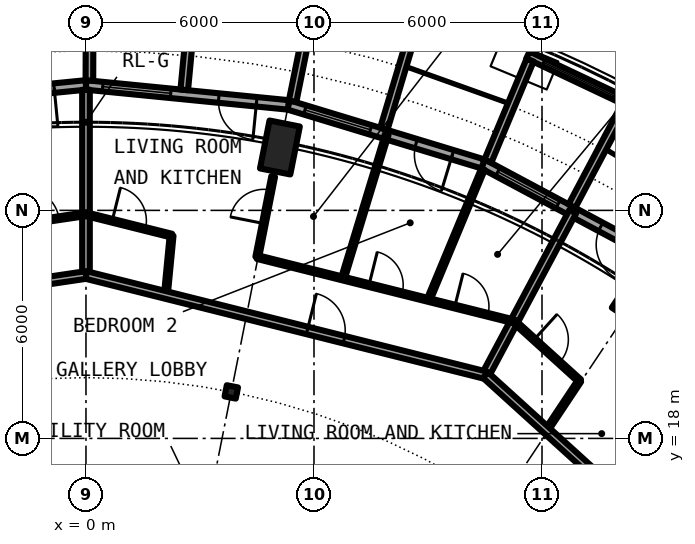
"""IFC4 building model, lengths in metres.
Left out: names, types, materials, properties, quantities, classifications, styles, units other than length and angle.
Written with IfcOpenShell. Run it as: python <this file> out.ifc"""

import sys

from ifc_helpers import new_model, si_unit, direction, frame, frame_2d, origin, origin_2d, place, context, subcontext, project, spatial, rectangle, circle, hollow_circle, i_section, extrude, element, fill, save


model = new_model("IFC4")
c1 = context("Model", 3, precision=1e-05, world=origin(), true_north=direction((0.0, 1.0)))
c2 = subcontext(c1, "Body", "Model", "MODEL_VIEW")
j1 = project(units=[si_unit("LENGTHUNIT", "METRE"), si_unit("PLANEANGLEUNIT", "RADIAN")], contexts=[c1])
p1 = place(None, origin())
s1 = spatial("IfcSite", under=j1, at=p1, CompositionType="ELEMENT")
p2 = place(p1, origin())
s2 = spatial("IfcBuilding", under=s1, at=p2, CompositionType="ELEMENT")
p3 = place(p2, frame((0.0, 0.0, 234.05)))
s3 = spatial("IfcBuildingStorey", under=s2, at=p3, CompositionType="ELEMENT", Elevation=234.05)
p4 = place(p3, frame((14.889, 22.283, 0.0), z_axis=(-0.231777820067, -0.346913947437, 0.908806775502), x_axis=(0.831494710184, -0.555532669549, 0.0)))
e1 = element("IfcColumn", 1, at=p4, inside=s3, PredefinedType="COLUMN", context=c2, shape_type="SweptSolid", body=[
    extrude(hollow_circle(Radius=0.406, WallThickness=0.03, at=origin_2d()), origin(), (0.0, 0.0, 1.0), 3.081),
])
p5 = place(p3, frame((5.229, 26.285, 0.0), z_axis=(-0.081382632414, -0.409131968018, 0.908838764516), x_axis=(0.980784718923, -0.195093144748, 0.0)))
e2 = element("IfcColumn", 2, at=p5, inside=s3, PredefinedType="COLUMN", context=c2, shape_type="SweptSolid", body=[
    extrude(hollow_circle(Radius=0.406, WallThickness=0.03, at=origin_2d()), origin(), (0.0, 0.0, 1.0), 3.081),
])
p6 = place(p3, frame((3.824, 19.223, 0.0), z_axis=(0.0, 0.0, 1.0), x_axis=(0.195090322016, 0.980785280403, 0.0)))
e3 = element("IfcColumn", 3, at=p6, inside=s3, PredefinedType="COLUMN", context=c2, shape_type="SweptSolid", body=[
    extrude(i_section(OverallWidth=0.3, OverallDepth=0.3, WebThickness=0.011, FlangeThickness=0.019, FilletRadius=0.027, at=origin_2d()), origin(), (0.0, 0.0, 1.0), 3.05),
])
p7 = place(p3, frame((15.167, 22.699, 0.0), z_axis=(0.0, 0.0, 1.0), x_axis=(-0.881915646801, 0.471407246368, 0.0)))
e4 = element("IfcWall", 4, at=p7, inside=s3, PredefinedType="SOLIDWALL", context=c2, shape_type="SweptSolid", body=[
    extrude(rectangle(XDim=5.352, YDim=0.25, at=frame_2d((2.676, 0.0))), origin(), (0.0, 0.0, 1.0), 2.7),
])
p8 = place(p7, frame((0.841, 0.0, 0.0)))
e5 = element("IfcOpeningElement", 5, at=p8, cuts=e4, PredefinedType="OPENING", context=c2, shape_type="SweptSolid", body=[
    extrude(rectangle(XDim=1.0, YDim=2.2, at=frame_2d((0.5, 1.1))), frame((0.0, 0.135, 0.0), z_axis=(0.0, -1.0, 0.0), x_axis=(1.0, 0.0, 0.0)), (0.0, 0.0, 1.0), 0.27),
])
p9 = place(p7, frame((3.111, 0.0, 0.3)))
e6 = element("IfcOpeningElement", 6, at=p9, cuts=e4, PredefinedType="OPENING", context=c2, shape_type="SweptSolid", body=[
    extrude(rectangle(XDim=1.8, YDim=2.1, at=frame_2d((0.9, 1.05))), frame((0.0, 0.135, 0.0), z_axis=(0.0, -1.0, 0.0), x_axis=(1.0, 0.0, 0.0)), (0.0, 0.0, 1.0), 0.27),
])
p10 = place(p3, frame((14.335, 26.808, -0.03), z_axis=(0.0, 0.0, 1.0), x_axis=(-0.904000060331, 0.427532327342, 0.0)))
e7 = element("IfcWall", 7, at=p10, inside=s3, PredefinedType="SOLIDWALL", context=c2, shape_type="SweptSolid", body=[
    extrude(rectangle(XDim=2.993, YDim=0.2, at=frame_2d((1.497, 0.0))), origin(), (0.0, 0.0, 1.0), 2.73),
])
p11 = place(p10, frame((0.457, 0.0, 0.33)))
e8 = element("IfcOpeningElement", 8, at=p11, cuts=e7, PredefinedType="OPENING", context=c2, shape_type="SweptSolid", body=[
    extrude(circle(Radius=1.04, at=frame_2d((1.04, 1.04))), frame((0.0, 0.11, 0.0), z_axis=(0.0, -1.0, 0.0), x_axis=(1.0, 0.0, 0.0)), (0.0, 0.0, 1.0), 0.22),
])
p12 = place(p3, frame((12.787, 24.113, -0.03), z_axis=(0.0, 0.0, 1.0), x_axis=(0.468365282436, 0.883534924159, 0.0)))
e9 = element("IfcWall", 9, at=p12, inside=s3, PredefinedType="SOLIDWALL", context=c2, shape_type="SweptSolid", body=[
    extrude(rectangle(XDim=3.006, YDim=0.2, at=frame_2d((1.503, 0.0))), origin(), (0.0, 0.0, 1.0), 2.73),
])
p13 = place(p3, frame((10.575, 25.295, -0.03), z_axis=(0.0, 0.0, 1.0), x_axis=(0.385697364644, 0.922625353492, 0.0)))
e10 = element("IfcWall", 10, at=p13, inside=s3, PredefinedType="SOLIDWALL", context=c2, shape_type="SweptSolid", body=[
    extrude(rectangle(XDim=2.883, YDim=0.2, at=frame_2d((1.442, 0.0))), origin(), (0.0, 0.0, 1.0), 2.73),
])
p14 = place(p3, frame((10.447, 25.222, 0.0), z_axis=(0.0, 0.0, 1.0), x_axis=(-0.956965678721, 0.290201119486, 0.0)))
e11 = element("IfcWall", 11, at=p14, inside=s3, PredefinedType="SOLIDWALL", context=c2, shape_type="SweptSolid", body=[
    extrude(rectangle(XDim=5.351, YDim=0.25, at=frame_2d((2.676, 0.0))), origin(), (0.0, 0.0, 1.0), 2.7),
])
p15 = place(p14, frame((0.841, 0.0, 0.0)))
e12 = element("IfcOpeningElement", 12, at=p15, cuts=e11, PredefinedType="OPENING", context=c2, shape_type="SweptSolid", body=[
    extrude(rectangle(XDim=1.0, YDim=2.2, at=frame_2d((0.5, 1.1))), frame((0.0, 0.135, 0.0), z_axis=(0.0, -1.0, 0.0), x_axis=(1.0, 0.0, 0.0)), (0.0, 0.0, 1.0), 0.27),
])
p16 = place(p14, frame((3.096, 0.0, 0.3)))
e13 = element("IfcOpeningElement", 13, at=p16, cuts=e11, PredefinedType="OPENING", context=c2, shape_type="SweptSolid", body=[
    extrude(rectangle(XDim=1.8, YDim=2.1, at=frame_2d((0.9, 1.05))), frame((0.0, 0.135, 0.0), z_axis=(0.0, -1.0, 0.0), x_axis=(1.0, 0.0, 0.0)), (0.0, 0.0, 1.0), 0.27),
])
p17 = place(p3, frame((7.837, 26.144, -0.03), z_axis=(0.0, 0.0, 1.0), x_axis=(0.287064767992, 0.957911174889, 0.0)))
e14 = element("IfcWall", 14, at=p17, inside=s3, PredefinedType="SOLIDWALL", context=c2, shape_type="SweptSolid", body=[
    extrude(rectangle(XDim=3.006, YDim=0.2, at=frame_2d((1.503, 0.0))), origin(), (0.0, 0.0, 1.0), 2.73),
])
p18 = place(p3, frame((5.437, 26.872, -0.03), z_axis=(0.0, 0.0, 1.0), x_axis=(0.198395337493, 0.980122079162, 0.0)))
e15 = element("IfcWall", 15, at=p18, inside=s3, PredefinedType="SOLIDWALL", context=c2, shape_type="SweptSolid", body=[
    extrude(rectangle(XDim=2.883, YDim=0.2, at=frame_2d((1.442, 0.0))), origin(), (0.0, 0.0, 1.0), 2.73),
])
p19 = place(p3, frame((5.326, 26.775, 0.0), z_axis=(0.0, 0.0, 1.0), x_axis=(-0.995173996315, 0.098126026407, 0.0)))
e16 = element("IfcWall", 16, at=p19, inside=s3, PredefinedType="SOLIDWALL", context=c2, shape_type="SweptSolid", body=[
    extrude(rectangle(XDim=5.352, YDim=0.25, at=frame_2d((2.676, 0.0))), origin(), (0.0, 0.0, 1.0), 2.7),
])
p20 = place(p19, frame((0.841, 0.0, 0.0)))
e17 = element("IfcOpeningElement", 17, at=p20, cuts=e16, PredefinedType="OPENING", context=c2, shape_type="SweptSolid", body=[
    extrude(rectangle(XDim=1.0, YDim=2.2, at=frame_2d((0.5, 1.1))), frame((0.0, 0.135, 0.0), z_axis=(0.0, -1.0, 0.0), x_axis=(1.0, 0.0, 0.0)), (0.0, 0.0, 1.0), 0.27),
])
p21 = place(p19, frame((3.111, 0.0, 0.3)))
e18 = element("IfcOpeningElement", 18, at=p21, cuts=e16, PredefinedType="OPENING", context=c2, shape_type="SweptSolid", body=[
    extrude(rectangle(XDim=1.8, YDim=2.1, at=frame_2d((0.9, 1.05))), frame((0.0, 0.135, 0.0), z_axis=(0.0, -1.0, 0.0), x_axis=(1.0, 0.0, 0.0)), (0.0, 0.0, 1.0), 0.27),
])
p22 = place(p3, frame((2.586, 27.171, -0.03), z_axis=(0.0, 0.0, 1.0), x_axis=(0.094548432284, 0.995520262954, 0.0)))
e19 = element("IfcWall", 19, at=p22, inside=s3, PredefinedType="SOLIDWALL", context=c2, shape_type="SweptSolid", body=[
    extrude(rectangle(XDim=3.006, YDim=0.2, at=frame_2d((1.503, 0.0))), origin(), (0.0, 0.0, 1.0), 2.73),
])
p23 = place(p3, frame((0.09, 27.417, -0.03), z_axis=(0.0, 0.0, 1.0), x_axis=(0.00347308367, 0.999993968827, 0.0)))
e20 = element("IfcWall", 20, at=p23, inside=s3, PredefinedType="SOLIDWALL", context=c2, shape_type="SweptSolid", body=[
    extrude(rectangle(XDim=2.882, YDim=0.2, at=frame_2d((1.441, 0.0))), origin(), (0.0, 0.0, 1.0), 2.73),
])
p24 = place(p3, frame((0.0, 27.3, 0.0), z_axis=(0.0, 0.0, 1.0), x_axis=(-0.995173996315, -0.098126026407, 0.0)))
e21 = element("IfcWall", 21, at=p24, inside=s3, PredefinedType="SOLIDWALL", context=c2, shape_type="SweptSolid", body=[
    extrude(rectangle(XDim=5.352, YDim=0.25, at=frame_2d((2.676, 0.0))), origin(), (0.0, 0.0, 1.0), 2.7),
])
p25 = place(p24, frame((0.841, 0.0, 0.0)))
e22 = element("IfcOpeningElement", 22, at=p25, cuts=e21, PredefinedType="OPENING", context=c2, shape_type="SweptSolid", body=[
    extrude(rectangle(XDim=1.0, YDim=2.2, at=frame_2d((0.5, 1.1))), frame((0.0, 0.135, 0.0), z_axis=(0.0, -1.0, 0.0), x_axis=(1.0, 0.0, 0.0)), (0.0, 0.0, 1.0), 0.27),
])
p26 = place(p24, frame((3.096, 0.0, 0.3)))
e23 = element("IfcOpeningElement", 23, at=p26, cuts=e21, PredefinedType="OPENING", context=c2, shape_type="SweptSolid", body=[
    extrude(rectangle(XDim=1.8, YDim=2.1, at=frame_2d((0.9, 1.05))), frame((0.0, 0.135, 0.0), z_axis=(0.0, -1.0, 0.0), x_axis=(1.0, 0.0, 0.0)), (0.0, 0.0, 1.0), 0.27),
])
p27 = place(p3, frame((0.0, 22.3, 0.0), z_axis=(0.0, 0.0, 1.0), x_axis=(0.0, 1.0, 0.0)))
e24 = element("IfcWall", 24, at=p27, inside=s3, PredefinedType="PARTITIONING", context=c2, shape_type="SweptSolid", body=[
    extrude(rectangle(XDim=4.875, YDim=0.2, at=frame_2d((2.438, 0.0))), origin(), (0.0, 0.0, 1.0), 2.7),
])
p28 = place(p3, frame((2.102, 21.773, 0.0), z_axis=(0.0, 0.0, 1.0), x_axis=(0.09608568494, 0.995373066317, 0.0)))
e25 = element("IfcWall", 25, at=p28, inside=s3, PredefinedType="PARTITIONING", context=c2, shape_type="SweptSolid", body=[
    extrude(rectangle(XDim=1.57, YDim=0.1, at=frame_2d((0.785, 0.0))), origin(), (0.0, 0.0, 1.0), 2.7),
])
p29 = place(p3, frame((4.507, 22.771, 0.0), z_axis=(0.0, 0.0, 1.0), x_axis=(0.193963698758, 0.981008707181, 0.0)))
e26 = element("IfcWall", 26, at=p29, inside=s3, PredefinedType="PARTITIONING", context=c2, shape_type="SweptSolid", body=[
    extrude(rectangle(XDim=2.16, YDim=0.1, at=frame_2d((1.08, 0.0))), origin(), (0.0, 0.0, 1.0), 2.7),
])
p30 = place(p29, frame((0.9, 0.0, 0.0)))
e27 = element("IfcOpeningElement", 27, at=p30, cuts=e26, PredefinedType="OPENING", context=c2, shape_type="SweptSolid", body=[
    extrude(rectangle(XDim=0.9, YDim=2.3, at=frame_2d((0.45, 1.15))), frame((0.0, 0.06, 0.0), z_axis=(0.0, -1.0, 0.0), x_axis=(1.0, 0.0, 0.0)), (0.0, 0.0, 1.0), 0.12),
])
p31 = place(p3, frame((6.76, 22.207, 0.0), z_axis=(0.0, 0.0, 1.0), x_axis=(0.291291575636, 0.956634317785, 0.0)))
e28 = element("IfcWall", 28, at=p31, inside=s3, PredefinedType="PARTITIONING", context=c2, shape_type="SweptSolid", body=[
    extrude(rectangle(XDim=3.962, YDim=0.1, at=frame_2d((1.981, 0.0))), origin(), (0.0, 0.0, 1.0), 2.7),
])
p32 = place(p3, frame((9.013, 21.642, 0.0), z_axis=(0.0, 0.0, 1.0), x_axis=(0.384420204655, 0.923158223845, 0.0)))
e29 = element("IfcWall", 29, at=p32, inside=s3, PredefinedType="PARTITIONING", context=c2, shape_type="SweptSolid", body=[
    extrude(rectangle(XDim=3.73, YDim=0.1, at=frame_2d((1.865, 0.0))), origin(), (0.0, 0.0, 1.0), 2.7),
])
p33 = place(p3, frame((10.512, 19.667, 0.0), z_axis=(0.0, 0.0, 1.0), x_axis=(0.471271812246, 0.881988026553, 0.0)))
e30 = element("IfcWall", 30, at=p33, inside=s3, PredefinedType="PARTITIONING", context=c2, shape_type="SweptSolid", body=[
    extrude(rectangle(XDim=4.874, YDim=0.2, at=frame_2d((2.437, 0.0))), origin(), (0.0, 0.0, 1.0), 2.7),
])
p34 = place(p3, frame((12.118, 18.211, 0.0), z_axis=(0.0, 0.0, 1.0), x_axis=(0.554125989098, 0.832432813028, 0.0)))
e31 = element("IfcWall", 31, at=p34, inside=s3, PredefinedType="PARTITIONING", context=c2, shape_type="SweptSolid", body=[
    extrude(rectangle(XDim=1.57, YDim=0.1, at=frame_2d((0.785, 0.0))), origin(), (0.0, 0.0, 1.0), 2.7),
])
p35 = place(p3, frame((0.0, 22.3, 0.0), z_axis=(0.0, 0.0, 1.0), x_axis=(0.969975381822, -0.243203122222, 0.0)))
e32 = element("IfcWall", 32, at=p35, inside=s3, PredefinedType="PARTITIONING", context=c2, shape_type="SweptSolid", body=[
    extrude(rectangle(XDim=10.843, YDim=0.2, at=frame_2d((5.421, 0.0))), origin(), (0.0, 0.0, 1.0), 2.7),
])
p36 = place(p35, frame((6.002, 0.0, 0.0)))
e33 = element("IfcOpeningElement", 33, at=p36, cuts=e32, PredefinedType="OPENING", context=c2, shape_type="SweptSolid", body=[
    extrude(rectangle(XDim=1.0, YDim=2.3, at=frame_2d((0.5, 1.15))), frame((0.0, 0.11, 0.0), z_axis=(0.0, -1.0, 0.0), x_axis=(1.0, 0.0, 0.0)), (0.0, 0.0, 1.0), 0.22),
])
p37 = place(p3, frame((10.512, 19.667, 0.0), z_axis=(0.0, 0.0, 1.0), x_axis=(0.740849323054, -0.67167125927, 0.0)))
e34 = element("IfcWall", 34, at=p37, inside=s3, PredefinedType="PARTITIONING", context=c2, shape_type="SweptSolid", body=[
    extrude(rectangle(XDim=10.842, YDim=0.2, at=frame_2d((5.421, 0.0))), origin(), (0.0, 0.0, 1.0), 2.7),
])
p38 = place(p37, frame((6.003, 0.0, 0.0)))
e35 = element("IfcOpeningElement", 35, at=p38, cuts=e34, PredefinedType="OPENING", context=c2, shape_type="SweptSolid", body=[
    extrude(rectangle(XDim=1.0, YDim=2.3, at=frame_2d((0.5, 1.15))), frame((0.0, 0.11, 0.0), z_axis=(0.0, -1.0, 0.0), x_axis=(1.0, 0.0, 0.0)), (0.0, 0.0, 1.0), 0.22),
])
p39 = place(p3, frame((-6.473, 21.34, 0.0), z_axis=(0.0, 0.0, 1.0), x_axis=(0.989181015112, 0.146700100005, 0.0)))
e36 = element("IfcWall", 36, at=p39, inside=s3, PredefinedType="PARTITIONING", context=c2, shape_type="SweptSolid", body=[
    extrude(rectangle(XDim=6.544, YDim=0.2, at=frame_2d((3.272, 0.0))), origin(), (0.0, 0.0, 1.0), 2.7),
])
p40 = place(p39, frame((1.681, 0.0, 0.0)))
e37 = element("IfcOpeningElement", 37, at=p40, cuts=e36, PredefinedType="OPENING", context=c2, shape_type="SweptSolid", body=[
    extrude(rectangle(XDim=1.0, YDim=2.3, at=frame_2d((0.5, 1.15))), frame((0.0, 0.11, 0.0), z_axis=(0.0, -1.0, 0.0), x_axis=(1.0, 0.0, 0.0)), (0.0, 0.0, 1.0), 0.22),
])
p41 = place(p3, frame((0.003, 23.899, 0.0), z_axis=(0.0, 0.0, 1.0), x_axis=(0.970074448647, -0.242807668911, 0.0)))
e38 = element("IfcWall", 38, at=p41, inside=s3, PredefinedType="PARTITIONING", context=c2, shape_type="SweptSolid", body=[
    extrude(rectangle(XDim=2.323, YDim=0.1, at=frame_2d((1.161, 0.0))), origin(), (0.0, 0.0, 1.0), 2.7),
])
p42 = place(p41, frame((0.708, 0.0, 0.0)))
e39 = element("IfcOpeningElement", 39, at=p42, cuts=e38, PredefinedType="OPENING", context=c2, shape_type="SweptSolid", body=[
    extrude(rectangle(XDim=0.9, YDim=2.3, at=frame_2d((0.45, 1.15))), frame((0.0, 0.06, 0.0), z_axis=(0.0, -1.0, 0.0), x_axis=(1.0, 0.0, 0.0)), (0.0, 0.0, 1.0), 0.12),
])
p43 = place(p3, frame((4.507, 22.771, 0.0), z_axis=(0.0, 0.0, 1.0), x_axis=(0.970020829306, -0.243021790611, 0.0)))
e40 = element("IfcWall", 40, at=p43, inside=s3, PredefinedType="PARTITIONING", context=c2, shape_type="SweptSolid", body=[
    extrude(rectangle(XDim=6.971, YDim=0.1, at=frame_2d((3.485, 0.0))), origin(), (0.0, 0.0, 1.0), 2.7),
])
p44 = place(p43, frame((3.031, 0.0, 0.0)))
e41 = element("IfcOpeningElement", 41, at=p44, cuts=e40, PredefinedType="OPENING", context=c2, shape_type="SweptSolid", body=[
    extrude(rectangle(XDim=0.9, YDim=2.3, at=frame_2d((0.45, 1.15))), frame((0.0, 0.06, 0.0), z_axis=(0.0, -1.0, 0.0), x_axis=(1.0, 0.0, 0.0)), (0.0, 0.0, 1.0), 0.12),
])
p45 = place(p43, frame((5.358, 0.0, 0.0)))
e42 = element("IfcOpeningElement", 42, at=p45, cuts=e40, PredefinedType="OPENING", context=c2, shape_type="SweptSolid", body=[
    extrude(rectangle(XDim=0.9, YDim=2.3, at=frame_2d((0.45, 1.15))), frame((0.0, 0.06, 0.0), z_axis=(0.0, -1.0, 0.0), x_axis=(1.0, 0.0, 0.0)), (0.0, 0.0, 1.0), 0.12),
])
p46 = place(p3, frame((11.271, 21.074, 0.0), z_axis=(0.0, 0.0, 1.0), x_axis=(0.74087097024, -0.671647381783, 0.0)))
e43 = element("IfcWall", 43, at=p46, inside=s3, PredefinedType="PARTITIONING", context=c2, shape_type="SweptSolid", body=[
    extrude(rectangle(XDim=2.324, YDim=0.1, at=frame_2d((1.162, 0.0))), origin(), (0.0, 0.0, 1.0), 2.7),
])
p47 = place(p46, frame((0.705, 0.0, 0.0)))
e44 = element("IfcOpeningElement", 44, at=p47, cuts=e43, PredefinedType="OPENING", context=c2, shape_type="SweptSolid", body=[
    extrude(rectangle(XDim=0.9, YDim=2.3, at=frame_2d((0.45, 1.15))), frame((0.0, 0.06, 0.0), z_axis=(0.0, -1.0, 0.0), x_axis=(1.0, 0.0, 0.0)), (0.0, 0.0, 1.0), 0.12),
])
p48 = place(p3, frame((-2.313, 23.557, 0.0), z_axis=(0.0, 0.0, 1.0), x_axis=(0.989181588285, 0.146696235121, 0.0)))
e45 = element("IfcWall", 45, at=p48, inside=s3, PredefinedType="PARTITIONING", context=c2, shape_type="SweptSolid", body=[
    extrude(rectangle(XDim=2.338, YDim=0.1, at=frame_2d((1.169, 0.0))), origin(), (0.0, 0.0, 1.0), 2.7),
])
p49 = place(p48, frame((0.719, 0.0, 0.0)))
e46 = element("IfcOpeningElement", 46, at=p49, cuts=e45, PredefinedType="OPENING", context=c2, shape_type="SweptSolid", body=[
    extrude(rectangle(XDim=0.9, YDim=2.3, at=frame_2d((0.45, 1.15))), frame((0.0, 0.06, 0.0), z_axis=(0.0, -1.0, 0.0), x_axis=(1.0, 0.0, 0.0)), (0.0, 0.0, 1.0), 0.12),
])
p50 = place(p8, origin())
e47 = element("IfcDoor", 47, at=p50, inside=s3, OperationType="SINGLE_SWING_LEFT", PredefinedType="DOOR", context=c2, shape_type="SweptSolid", body=[
    extrude(rectangle(XDim=1.0, YDim=2.2, at=frame_2d((0.5, 1.1))), frame((0.0, 0.025, 0.0), z_axis=(0.0, -1.0, 0.0), x_axis=(1.0, 0.0, 0.0)), (0.0, 0.0, 1.0), 0.05),
])
fill(e5, e47)
p51 = place(p9, origin())
e48 = element("IfcWindow", 48, at=p51, inside=s3, PartitioningType="SINGLE_PANEL", PredefinedType="WINDOW", context=c2, shape_type="SweptSolid", body=[
    extrude(rectangle(XDim=1.8, YDim=2.1, at=frame_2d((0.9, 1.05))), frame((0.0, 0.03, 0.0), z_axis=(0.0, -1.0, 0.0), x_axis=(1.0, 0.0, 0.0)), (0.0, 0.0, 1.0), 0.06),
])
fill(e6, e48)
p52 = place(p11, origin())
e49 = element("IfcWindow", 49, at=p52, inside=s3, PartitioningType="SINGLE_PANEL", PredefinedType="WINDOW", context=c2, shape_type="SweptSolid", body=[
    extrude(circle(Radius=1.04, at=frame_2d((1.04, 1.04))), frame((0.0, 0.03, 0.0), z_axis=(0.0, -1.0, 0.0), x_axis=(1.0, 0.0, 0.0)), (0.0, 0.0, 1.0), 0.06),
])
fill(e8, e49)
p53 = place(p15, origin())
e50 = element("IfcDoor", 50, at=p53, inside=s3, OperationType="SINGLE_SWING_LEFT", PredefinedType="DOOR", context=c2, shape_type="SweptSolid", body=[
    extrude(rectangle(XDim=1.0, YDim=2.2, at=frame_2d((0.5, 1.1))), frame((0.0, 0.025, 0.0), z_axis=(0.0, -1.0, 0.0), x_axis=(1.0, 0.0, 0.0)), (0.0, 0.0, 1.0), 0.05),
])
fill(e12, e50)
p54 = place(p16, origin())
e51 = element("IfcWindow", 51, at=p54, inside=s3, PartitioningType="SINGLE_PANEL", PredefinedType="WINDOW", context=c2, shape_type="SweptSolid", body=[
    extrude(rectangle(XDim=1.8, YDim=2.1, at=frame_2d((0.9, 1.05))), frame((0.0, 0.03, 0.0), z_axis=(0.0, -1.0, 0.0), x_axis=(1.0, 0.0, 0.0)), (0.0, 0.0, 1.0), 0.06),
])
fill(e13, e51)
p55 = place(p20, origin())
e52 = element("IfcDoor", 52, at=p55, inside=s3, OperationType="SINGLE_SWING_LEFT", PredefinedType="DOOR", context=c2, shape_type="SweptSolid", body=[
    extrude(rectangle(XDim=1.0, YDim=2.2, at=frame_2d((0.5, 1.1))), frame((0.0, 0.025, 0.0), z_axis=(0.0, -1.0, 0.0), x_axis=(1.0, 0.0, 0.0)), (0.0, 0.0, 1.0), 0.05),
])
fill(e17, e52)
p56 = place(p21, origin())
e53 = element("IfcWindow", 53, at=p56, inside=s3, PartitioningType="SINGLE_PANEL", PredefinedType="WINDOW", context=c2, shape_type="SweptSolid", body=[
    extrude(rectangle(XDim=1.8, YDim=2.1, at=frame_2d((0.9, 1.05))), frame((0.0, 0.03, 0.0), z_axis=(0.0, -1.0, 0.0), x_axis=(1.0, 0.0, 0.0)), (0.0, 0.0, 1.0), 0.06),
])
fill(e18, e53)
p57 = place(p25, origin())
e54 = element("IfcDoor", 54, at=p57, inside=s3, OperationType="SINGLE_SWING_LEFT", PredefinedType="DOOR", context=c2, shape_type="SweptSolid", body=[
    extrude(rectangle(XDim=1.0, YDim=2.2, at=frame_2d((0.5, 1.1))), frame((0.0, 0.025, 0.0), z_axis=(0.0, -1.0, 0.0), x_axis=(1.0, 0.0, 0.0)), (0.0, 0.0, 1.0), 0.05),
])
fill(e22, e54)
p58 = place(p47, origin())
e55 = element("IfcDoor", 55, at=p58, inside=s3, OperationType="SINGLE_SWING_LEFT", PredefinedType="DOOR", context=c2, shape_type="SweptSolid", body=[
    extrude(rectangle(XDim=0.9, YDim=2.3, at=frame_2d((0.45, 1.15))), frame((0.0, 0.025, 0.0), z_axis=(0.0, -1.0, 0.0), x_axis=(1.0, 0.0, 0.0)), (0.0, 0.0, 1.0), 0.05),
])
fill(e44, e55)
p59 = place(p36, origin())
e56 = element("IfcDoor", 56, at=p59, inside=s3, OperationType="SINGLE_SWING_RIGHT", PredefinedType="DOOR", context=c2, shape_type="SweptSolid", body=[
    extrude(rectangle(XDim=1.0, YDim=2.3, at=frame_2d((0.5, 1.15))), frame((0.0, 0.025, 0.0), z_axis=(0.0, -1.0, 0.0), x_axis=(1.0, 0.0, 0.0)), (0.0, 0.0, 1.0), 0.05),
])
fill(e33, e56)
p60 = place(p42, origin())
e57 = element("IfcDoor", 57, at=p60, inside=s3, OperationType="SINGLE_SWING_LEFT", PredefinedType="DOOR", context=c2, shape_type="SweptSolid", body=[
    extrude(rectangle(XDim=0.9, YDim=2.3, at=frame_2d((0.45, 1.15))), frame((0.0, 0.025, 0.0), z_axis=(0.0, -1.0, 0.0), x_axis=(1.0, 0.0, 0.0)), (0.0, 0.0, 1.0), 0.05),
])
fill(e39, e57)
p61 = place(p30, origin())
e58 = element("IfcDoor", 58, at=p61, inside=s3, OperationType="SINGLE_SWING_RIGHT", PredefinedType="DOOR", context=c2, shape_type="SweptSolid", body=[
    extrude(rectangle(XDim=0.9, YDim=2.3, at=frame_2d((0.45, 1.15))), frame((0.0, 0.025, 0.0), z_axis=(0.0, -1.0, 0.0), x_axis=(1.0, 0.0, 0.0)), (0.0, 0.0, 1.0), 0.05),
])
fill(e27, e58)
p62 = place(p44, origin())
e59 = element("IfcDoor", 59, at=p62, inside=s3, OperationType="SINGLE_SWING_LEFT", PredefinedType="DOOR", context=c2, shape_type="SweptSolid", body=[
    extrude(rectangle(XDim=0.9, YDim=2.3, at=frame_2d((0.45, 1.15))), frame((0.0, 0.025, 0.0), z_axis=(0.0, -1.0, 0.0), x_axis=(1.0, 0.0, 0.0)), (0.0, 0.0, 1.0), 0.05),
])
fill(e41, e59)
p63 = place(p45, origin())
e60 = element("IfcDoor", 60, at=p63, inside=s3, OperationType="SINGLE_SWING_RIGHT", PredefinedType="DOOR", context=c2, shape_type="SweptSolid", body=[
    extrude(rectangle(XDim=0.9, YDim=2.3, at=frame_2d((0.45, 1.15))), frame((0.0, 0.025, 0.0), z_axis=(0.0, -1.0, 0.0), x_axis=(1.0, 0.0, 0.0)), (0.0, 0.0, 1.0), 0.05),
])
fill(e42, e60)
p64 = place(p49, origin())
e61 = element("IfcDoor", 61, at=p64, inside=s3, OperationType="SINGLE_SWING_LEFT", PredefinedType="DOOR", context=c2, shape_type="SweptSolid", body=[
    extrude(rectangle(XDim=0.9, YDim=2.3, at=frame_2d((0.45, 1.15))), frame((0.0, 0.025, 0.0), z_axis=(0.0, -1.0, 0.0), x_axis=(1.0, 0.0, 0.0)), (0.0, 0.0, 1.0), 0.05),
])
fill(e46, e61)
save(model, sys.argv[1])
